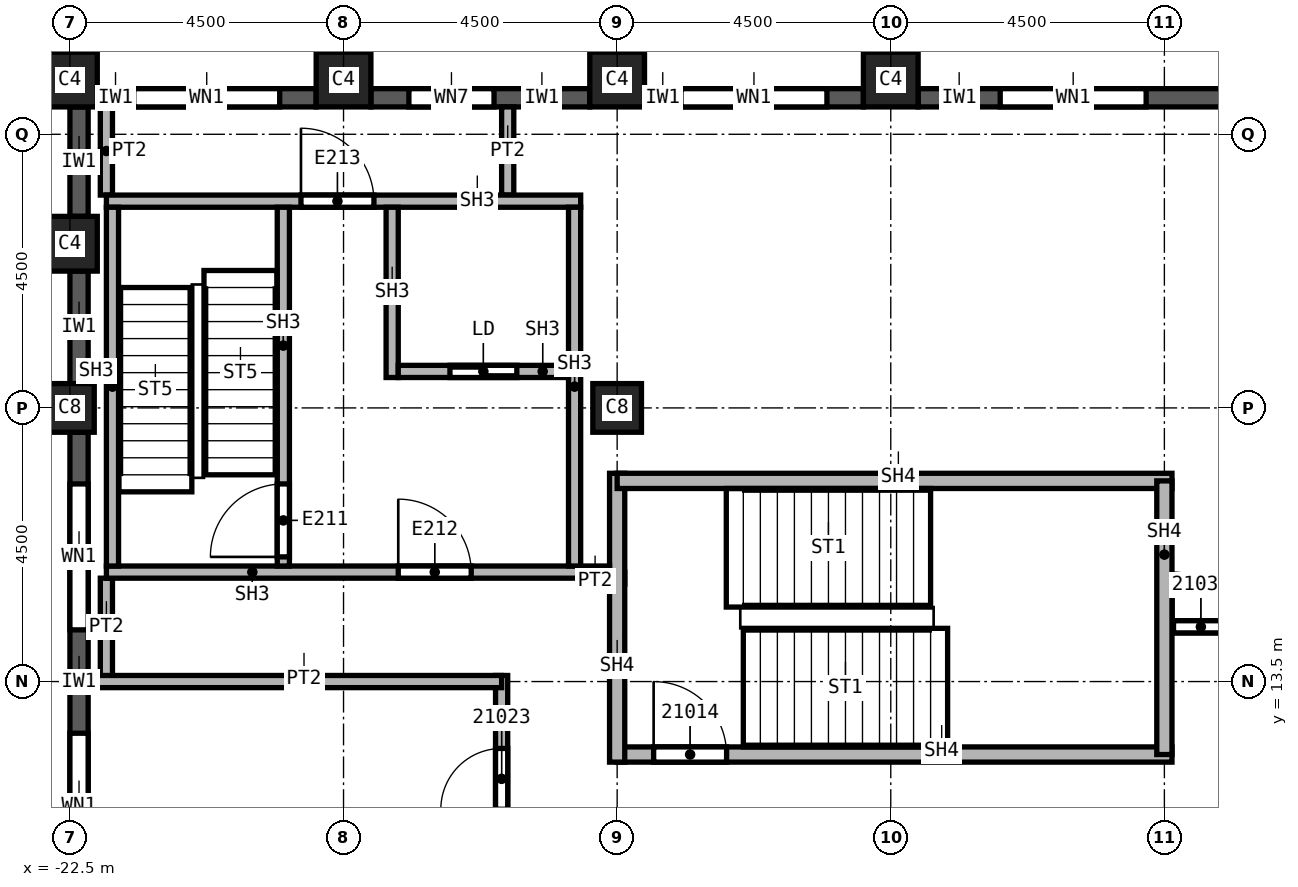
"""IFC4 building model, lengths in metres.
Left out: names, types, materials, properties, quantities, classifications, styles, units other than length and angle.
Written with IfcOpenShell. Run it as: python <this file> out.ifc"""

import sys

from ifc_helpers import new_model, si_unit, direction, frame, frame_2d, origin, origin_2d, place, context, subcontext, project, spatial, rectangle, extrude, element, fill, save


model = new_model("IFC4")
c1 = context("Model", 3, precision=1e-05, world=origin(), true_north=direction((0.0, 1.0)))
c2 = subcontext(c1, "Body", "Model", "MODEL_VIEW")
j1 = project(units=[si_unit("LENGTHUNIT", "METRE"), si_unit("PLANEANGLEUNIT", "RADIAN")], contexts=[c1])
p1 = place(None, origin())
s1 = spatial("IfcSite", under=j1, at=p1, CompositionType="ELEMENT")
p2 = place(p1, origin())
s2 = spatial("IfcBuilding", under=s1, at=p2, CompositionType="ELEMENT")
p3 = place(p2, frame((0.0, 0.0, 300.0)))
s3 = spatial("IfcBuildingStorey", under=s2, at=p3, CompositionType="ELEMENT", Elevation=300.0)
for number, where, z_axis, x_axis in (
    (1, (-13.5, 18.0, 0.0), (0.0, 0.0, 1.0), (1.0, 0.0, 0.0)),
    (2, (-22.5, 18.0, 0.0), (0.0, 0.0, 1.0), (1.0, 0.0, 0.0)),
):
    element("IfcColumn", number, at=place(p3, frame(where, z_axis=z_axis, x_axis=x_axis)), inside=s3, PredefinedType="COLUMN", context=c2, shape_type="SweptSolid", body=[
        extrude(rectangle(XDim=0.8, YDim=0.8, at=origin_2d()), origin(), (0.0, 0.0, 1.0), 3.74),
    ])
for number, where, z_axis, x_axis in (
    (3, (-9.0, 23.4, 0.0), (0.0, 0.0, 1.0), (1.0, 0.0, 0.0)),
    (4, (-13.5, 23.4, 0.0), (0.0, 0.0, 1.0), (1.0, 0.0, 0.0)),
    (5, (-18.0, 23.4, 0.0), (0.0, 0.0, 1.0), (1.0, 0.0, 0.0)),
    (6, (-22.5, 23.4, 0.0), (0.0, 0.0, 1.0), (1.0, 0.0, 0.0)),
    (7, (-22.5, 20.7, 0.0), (0.0, 0.0, 1.0), (1.0, 0.0, 0.0)),
):
    element("IfcColumn", number, at=place(p3, frame(where, z_axis=z_axis, x_axis=x_axis)), inside=s3, PredefinedType="COLUMN", context=c2, shape_type="SweptSolid", body=[
        extrude(rectangle(XDim=0.9, YDim=0.9, at=origin_2d()), origin(), (0.0, 0.0, 1.0), 3.74),
    ])
p4 = place(p3, frame((-3.45, 23.1, 0.0), z_axis=(0.0, 0.0, 1.0), x_axis=(-1.0, 0.0, 0.0)))
e8 = element("IfcWall", 8, at=p4, inside=s3, PredefinedType="SOLIDWALL", context=c2, shape_type="SweptSolid", body=[
    extrude(rectangle(XDim=5.1, YDim=0.3, at=frame_2d((2.55, 0.0))), origin(), (0.0, 0.0, 1.0), 3.14),
])
p5 = place(p4, frame((1.35, 0.0, 0.8)))
e9 = element("IfcOpeningElement", 9, at=p5, cuts=e8, PredefinedType="OPENING", context=c2, shape_type="SweptSolid", body=[
    extrude(rectangle(XDim=2.4, YDim=1.95, at=frame_2d((1.2, 0.975))), frame((0.0, 0.15, 0.0), z_axis=(0.0, -1.0, 0.0), x_axis=(1.0, 0.0, 0.0)), (0.0, 0.0, 1.0), 0.3),
])
p6 = place(p3, frame((-9.45, 23.1, 0.0), z_axis=(0.0, 0.0, 1.0), x_axis=(-1.0, 0.0, 0.0)))
e10 = element("IfcWall", 10, at=p6, inside=s3, PredefinedType="SOLIDWALL", context=c2, shape_type="SweptSolid", body=[
    extrude(rectangle(XDim=3.6, YDim=0.3, at=frame_2d((1.8, 0.0))), origin(), (0.0, 0.0, 1.0), 3.14),
])
p7 = place(p6, frame((0.6, 0.0, 0.8)))
e11 = element("IfcOpeningElement", 11, at=p7, cuts=e10, PredefinedType="OPENING", context=c2, shape_type="SweptSolid", body=[
    extrude(rectangle(XDim=2.4, YDim=1.95, at=frame_2d((1.2, 0.975))), frame((0.0, 0.15, 0.0), z_axis=(0.0, -1.0, 0.0), x_axis=(1.0, 0.0, 0.0)), (0.0, 0.0, 1.0), 0.3),
])
p8 = place(p3, frame((-13.95, 23.1, 0.0), z_axis=(0.0, 0.0, 1.0), x_axis=(-1.0, 0.0, 0.0)))
e12 = element("IfcWall", 12, at=p8, inside=s3, PredefinedType="SOLIDWALL", context=c2, shape_type="SweptSolid", body=[
    extrude(rectangle(XDim=3.6, YDim=0.3, at=frame_2d((1.8, 0.0))), origin(), (0.0, 0.0, 1.0), 3.14),
])
p9 = place(p8, frame((1.575, 0.0, 0.8)))
e13 = element("IfcOpeningElement", 13, at=p9, cuts=e12, PredefinedType="OPENING", context=c2, shape_type="SweptSolid", body=[
    extrude(rectangle(XDim=1.4, YDim=1.95, at=frame_2d((0.7, 0.975))), frame((0.0, 0.15, 0.0), z_axis=(0.0, -1.0, 0.0), x_axis=(1.0, 0.0, 0.0)), (0.0, 0.0, 1.0), 0.3),
])
p10 = place(p3, frame((-18.45, 23.1, 0.0), z_axis=(0.0, 0.0, 1.0), x_axis=(-1.0, 0.0, 0.0)))
e14 = element("IfcWall", 14, at=p10, inside=s3, PredefinedType="SOLIDWALL", context=c2, shape_type="SweptSolid", body=[
    extrude(rectangle(XDim=3.6, YDim=0.3, at=frame_2d((1.8, 0.0))), origin(), (0.0, 0.0, 1.0), 3.14),
])
p11 = place(p10, frame((0.6, 0.0, 0.8)))
e15 = element("IfcOpeningElement", 15, at=p11, cuts=e14, PredefinedType="OPENING", context=c2, shape_type="SweptSolid", body=[
    extrude(rectangle(XDim=2.4, YDim=1.95, at=frame_2d((1.2, 0.975))), frame((0.0, 0.15, 0.0), z_axis=(0.0, -1.0, 0.0), x_axis=(1.0, 0.0, 0.0)), (0.0, 0.0, 1.0), 0.3),
])
p12 = place(p3, frame((-22.35, 17.6, 0.0), z_axis=(0.0, 0.0, 1.0), x_axis=(0.0, -1.0, 0.0)))
e16 = element("IfcWall", 16, at=p12, inside=s3, PredefinedType="SOLIDWALL", context=c2, shape_type="SweptSolid", body=[
    extrude(rectangle(XDim=8.2, YDim=0.3, at=frame_2d((4.1, 0.0))), origin(), (0.0, 0.0, 1.0), 3.14),
])
p13 = place(p12, frame((0.85, 0.0, 0.8)))
e17 = element("IfcOpeningElement", 17, at=p13, cuts=e16, PredefinedType="OPENING", context=c2, shape_type="SweptSolid", body=[
    extrude(rectangle(XDim=2.4, YDim=1.95, at=frame_2d((1.2, 0.975))), frame((0.0, 0.15, 0.0), z_axis=(0.0, -1.0, 0.0), x_axis=(1.0, 0.0, 0.0)), (0.0, 0.0, 1.0), 0.3),
])
p14 = place(p12, frame((4.95, 0.0, 0.8)))
e18 = element("IfcOpeningElement", 18, at=p14, cuts=e16, PredefinedType="OPENING", context=c2, shape_type="SweptSolid", body=[
    extrude(rectangle(XDim=2.4, YDim=1.95, at=frame_2d((1.2, 0.975))), frame((0.0, 0.15, 0.0), z_axis=(0.0, -1.0, 0.0), x_axis=(1.0, 0.0, 0.0)), (0.0, 0.0, 1.0), 0.3),
])
p15 = place(p3, frame((-22.35, 20.25, 0.0), z_axis=(0.0, 0.0, 1.0), x_axis=(0.0, -1.0, 0.0)))
e19 = element("IfcWall", 19, at=p15, inside=s3, PredefinedType="SOLIDWALL", context=c2, shape_type="SweptSolid", body=[
    extrude(rectangle(XDim=1.85, YDim=0.3, at=frame_2d((0.925, 0.0))), origin(), (0.0, 0.0, 1.0), 3.14),
])
p16 = place(p3, frame((-22.35, 22.95, 0.0), z_axis=(0.0, 0.0, 1.0), x_axis=(0.0, -1.0, 0.0)))
e20 = element("IfcWall", 20, at=p16, inside=s3, PredefinedType="SOLIDWALL", context=c2, shape_type="SweptSolid", body=[
    extrude(rectangle(XDim=1.8, YDim=0.3, at=frame_2d((0.9, 0.0))), origin(), (0.0, 0.0, 1.0), 3.14),
])
p17 = place(p3, frame((-21.9, 13.5, 0.0), z_axis=(0.0, 0.0, 1.0), x_axis=(0.0, 1.0, 0.0)))
e21 = element("IfcWall", 21, at=p17, inside=s3, PredefinedType="PARTITIONING", context=c2, shape_type="SweptSolid", body=[
    extrude(rectangle(XDim=1.7, YDim=0.2, at=frame_2d((0.85, 0.0))), origin(), (0.0, 0.0, 1.0), 3.74),
])
p18 = place(p3, frame((-21.9, 21.5, 0.0), z_axis=(0.0, 0.0, 1.0), x_axis=(0.0, 1.0, 0.0)))
e22 = element("IfcWall", 22, at=p18, inside=s3, PredefinedType="PARTITIONING", context=c2, shape_type="SweptSolid", body=[
    extrude(rectangle(XDim=1.45, YDim=0.2, at=frame_2d((0.725, 0.0))), origin(), (0.0, 0.0, 1.0), 3.74),
])
p19 = place(p3, frame((-15.4, -22.95, 0.0), z_axis=(0.0, 0.0, 1.0), x_axis=(0.0, 1.0, 0.0)))
e23 = element("IfcWall", 23, at=p19, inside=s3, PredefinedType="PARTITIONING", context=c2, shape_type="SweptSolid", body=[
    extrude(rectangle(XDim=36.55, YDim=0.2, at=frame_2d((18.275, 0.0))), origin(), (0.0, 0.0, 1.0), 3.74),
])
p20 = place(p19, frame((23.1, 0.0, 0.0)))
e24 = element("IfcOpeningElement", 24, at=p20, cuts=e23, PredefinedType="OPENING", context=c2, shape_type="SweptSolid", body=[
    extrude(rectangle(XDim=1.0, YDim=2.1, at=frame_2d((0.5, 1.05))), frame((0.0, 0.1, 0.0), z_axis=(0.0, -1.0, 0.0), x_axis=(1.0, 0.0, 0.0)), (0.0, 0.0, 1.0), 0.2),
])
p21 = place(p19, frame((34.35, 0.0, 0.0)))
e25 = element("IfcOpeningElement", 25, at=p21, cuts=e23, PredefinedType="OPENING", context=c2, shape_type="SweptSolid", body=[
    extrude(rectangle(XDim=1.0, YDim=2.1, at=frame_2d((0.5, 1.05))), frame((0.0, 0.1, 0.0), z_axis=(0.0, -1.0, 0.0), x_axis=(1.0, 0.0, 0.0)), (0.0, 0.0, 1.0), 0.2),
])
p22 = place(p19, frame((2.95, 0.0, 0.0)))
e26 = element("IfcOpeningElement", 26, at=p22, cuts=e23, PredefinedType="OPENING", context=c2, shape_type="SweptSolid", body=[
    extrude(rectangle(XDim=1.0, YDim=2.1, at=frame_2d((0.5, 1.05))), frame((0.0, 0.1, 0.0), z_axis=(0.0, -1.0, 0.0), x_axis=(1.0, 0.0, 0.0)), (0.0, 0.0, 1.0), 0.2),
])
p23 = place(p19, frame((6.15, 0.0, 0.0)))
e27 = element("IfcOpeningElement", 27, at=p23, cuts=e23, PredefinedType="OPENING", context=c2, shape_type="SweptSolid", body=[
    extrude(rectangle(XDim=1.0, YDim=2.1, at=frame_2d((0.5, 1.05))), frame((0.0, 0.1, 0.0), z_axis=(0.0, -1.0, 0.0), x_axis=(1.0, 0.0, 0.0)), (0.0, 0.0, 1.0), 0.2),
])
p24 = place(p19, frame((8.625, 0.0, 0.0)))
e28 = element("IfcOpeningElement", 28, at=p24, cuts=e23, PredefinedType="OPENING", context=c2, shape_type="SweptSolid", body=[
    extrude(rectangle(XDim=1.0, YDim=2.1, at=frame_2d((0.5, 1.05))), frame((0.0, 0.1, 0.0), z_axis=(0.0, -1.0, 0.0), x_axis=(1.0, 0.0, 0.0)), (0.0, 0.0, 1.0), 0.2),
])
p25 = place(p19, frame((15.0, 0.0, 0.0)))
e29 = element("IfcOpeningElement", 29, at=p25, cuts=e23, PredefinedType="OPENING", context=c2, shape_type="SweptSolid", body=[
    extrude(rectangle(XDim=1.0, YDim=2.1, at=frame_2d((0.5, 1.05))), frame((0.0, 0.1, 0.0), z_axis=(0.0, -1.0, 0.0), x_axis=(1.0, 0.0, 0.0)), (0.0, 0.0, 1.0), 0.2),
])
p26 = place(p3, frame((-15.4, 13.5, 0.0), z_axis=(0.0, 0.0, 1.0), x_axis=(-1.0, 0.0, 0.0)))
e30 = element("IfcWall", 30, at=p26, inside=s3, PredefinedType="PARTITIONING", context=c2, shape_type="SweptSolid", body=[
    extrude(rectangle(XDim=6.8, YDim=0.2, at=frame_2d((3.4, 0.0))), origin(), (0.0, 0.0, 1.0), 3.74),
])
p27 = place(p3, frame((-15.3, 22.95, 0.0), z_axis=(0.0, 0.0, 1.0), x_axis=(0.0, -1.0, 0.0)))
e31 = element("IfcWall", 31, at=p27, inside=s3, PredefinedType="PARTITIONING", context=c2, shape_type="SweptSolid", body=[
    extrude(rectangle(XDim=1.45, YDim=0.2, at=frame_2d((0.725, 0.0))), origin(), (0.0, 0.0, 1.0), 3.74),
])
p28 = place(p3, frame((-14.1, 15.2, 0.0), z_axis=(0.0, 0.0, 1.0), x_axis=(1.0, 0.0, 0.0)))
e32 = element("IfcWall", 32, at=p28, inside=s3, PredefinedType="PARTITIONING", context=c2, shape_type="SweptSolid", body=[
    extrude(rectangle(XDim=0.725, YDim=0.2, at=frame_2d((0.363, 0.0))), origin(), (0.0, 0.0, 1.0), 3.74),
])
p29 = place(p3, frame((-4.5, 14.4, 0.0), z_axis=(0.0, 0.0, 1.0), x_axis=(1.0, 0.0, 0.0)))
e33 = element("IfcWall", 33, at=p29, inside=s3, PredefinedType="PARTITIONING", context=c2, shape_type="SweptSolid", body=[
    extrude(rectangle(XDim=3.6, YDim=0.2, at=frame_2d((1.8, 0.0))), origin(), (0.0, 0.0, 1.0), 3.207),
])
p30 = place(p29, frame((0.15, 0.0, 0.0)))
e34 = element("IfcOpeningElement", 34, at=p30, cuts=e33, PredefinedType="OPENING", context=c2, shape_type="SweptSolid", body=[
    extrude(rectangle(XDim=0.9, YDim=2.1, at=frame_2d((0.45, 1.05))), frame((0.0, 0.1, 0.0), z_axis=(0.0, -1.0, 0.0), x_axis=(1.0, 0.0, 0.0)), (0.0, 0.0, 1.0), 0.2),
])
p31 = place(p3, frame((-13.5, 12.3, 0.0), z_axis=(0.0, 0.0, 1.0), x_axis=(1.0, 0.0, 0.0)))
e35 = element("IfcWall", 35, at=p31, inside=s3, PredefinedType="SOLIDWALL", context=c2, shape_type="SweptSolid", body=[
    extrude(rectangle(XDim=9.125, YDim=0.25, at=frame_2d((4.562, 0.0))), origin(), (0.0, 0.0, 1.0), 3.74),
])
p32 = place(p31, frame((0.6, 0.0, 0.0)))
e36 = element("IfcOpeningElement", 36, at=p32, cuts=e35, PredefinedType="OPENING", context=c2, shape_type="SweptSolid", body=[
    extrude(rectangle(XDim=1.2, YDim=2.1, at=frame_2d((0.6, 1.05))), frame((0.0, 0.125, 0.0), z_axis=(0.0, -1.0, 0.0), x_axis=(1.0, 0.0, 0.0)), (0.0, 0.0, 1.0), 0.25),
])
p33 = place(p3, frame((-13.5, 12.175, 0.0), z_axis=(0.0, 0.0, 1.0), x_axis=(0.0, 1.0, 0.0)))
e37 = element("IfcWall", 37, at=p33, inside=s3, PredefinedType="SOLIDWALL", context=c2, shape_type="SweptSolid", body=[
    extrude(rectangle(XDim=4.75, YDim=0.25, at=frame_2d((2.375, 0.0))), origin(), (0.0, 0.0, 1.0), 3.74),
])
p34 = place(p3, frame((-13.5, 16.8, 0.0), z_axis=(0.0, 0.0, 1.0), x_axis=(1.0, 0.0, 0.0)))
e38 = element("IfcWall", 38, at=p34, inside=s3, PredefinedType="SOLIDWALL", context=c2, shape_type="SweptSolid", body=[
    extrude(rectangle(XDim=9.125, YDim=0.25, at=frame_2d((4.562, 0.0))), origin(), (0.0, 0.0, 1.0), 3.74),
])
p35 = place(p3, frame((-4.5, 16.8, 0.0), z_axis=(0.0, 0.0, 1.0), x_axis=(0.0, -1.0, 0.0)))
e39 = element("IfcWall", 39, at=p35, inside=s3, PredefinedType="SOLIDWALL", context=c2, shape_type="SweptSolid", body=[
    extrude(rectangle(XDim=4.5, YDim=0.25, at=frame_2d((2.25, 0.0))), origin(), (0.0, 0.0, 1.0), 3.74),
])
p36 = place(p3, frame((-21.9, 15.3, 0.0), z_axis=(0.0, 0.0, 1.0), x_axis=(1.0, 0.0, 0.0)))
e40 = element("IfcWall", 40, at=p36, inside=s3, PredefinedType="SOLIDWALL", context=c2, shape_type="SweptSolid", body=[
    extrude(rectangle(XDim=8.275, YDim=0.2, at=frame_2d((4.137, 0.0))), origin(), (0.0, 0.0, 1.0), 3.74),
])
p37 = place(p36, frame((4.8, 0.0, 0.0)))
e41 = element("IfcOpeningElement", 41, at=p37, cuts=e40, PredefinedType="OPENING", context=c2, shape_type="SweptSolid", body=[
    extrude(rectangle(XDim=1.2, YDim=2.1, at=frame_2d((0.6, 1.05))), frame((0.0, 0.1, 0.0), z_axis=(0.0, -1.0, 0.0), x_axis=(1.0, 0.0, 0.0)), (0.0, 0.0, 1.0), 0.2),
])
p38 = place(p3, frame((-21.9, 21.4, 0.0), z_axis=(0.0, 0.0, 1.0), x_axis=(1.0, 0.0, 0.0)))
e42 = element("IfcWall", 42, at=p38, inside=s3, PredefinedType="SOLIDWALL", context=c2, shape_type="SweptSolid", body=[
    extrude(rectangle(XDim=7.8, YDim=0.2, at=frame_2d((3.9, 0.0))), origin(), (0.0, 0.0, 1.0), 3.74),
])
p39 = place(p38, frame((3.2, 0.0, 0.0)))
e43 = element("IfcOpeningElement", 43, at=p39, cuts=e42, PredefinedType="OPENING", context=c2, shape_type="SweptSolid", body=[
    extrude(rectangle(XDim=1.2, YDim=2.1, at=frame_2d((0.6, 1.05))), frame((0.0, 0.1, 0.0), z_axis=(0.0, -1.0, 0.0), x_axis=(1.0, 0.0, 0.0)), (0.0, 0.0, 1.0), 0.2),
])
for number, where, z_axis, x_axis in (
    (44, (-21.8, 15.4, 0.0), (0.0, 0.0, 1.0), (0.0, 1.0, 0.0)),
    (45, (-14.2, 15.4, 0.0), (0.0, 0.0, 1.0), (0.0, 1.0, 0.0)),
):
    element("IfcWall", number, at=place(p3, frame(where, z_axis=z_axis, x_axis=x_axis)), inside=s3, PredefinedType="SOLIDWALL", context=c2, shape_type="SweptSolid", body=[
        extrude(rectangle(XDim=5.9, YDim=0.2, at=frame_2d((2.95, 0.0))), origin(), (0.0, 0.0, 1.0), 3.74),
    ])
p40 = place(p3, frame((-18.99, 15.4, 0.0), z_axis=(0.0, 0.0, 1.0), x_axis=(0.0, 1.0, 0.0)))
e46 = element("IfcWall", 46, at=p40, inside=s3, PredefinedType="SOLIDWALL", context=c2, shape_type="SweptSolid", body=[
    extrude(rectangle(XDim=5.9, YDim=0.2, at=frame_2d((2.95, 0.0))), origin(), (0.0, 0.0, 1.0), 3.74),
])
p41 = place(p40, frame((0.15, 0.0, 0.0)))
e47 = element("IfcOpeningElement", 47, at=p41, cuts=e46, PredefinedType="OPENING", context=c2, shape_type="SweptSolid", body=[
    extrude(rectangle(XDim=1.2, YDim=2.1, at=frame_2d((0.6, 1.05))), frame((0.0, 0.1, 0.0), z_axis=(0.0, -1.0, 0.0), x_axis=(1.0, 0.0, 0.0)), (0.0, 0.0, 1.0), 0.2),
])
p42 = place(p3, frame((-17.2, 18.5, 0.0), z_axis=(0.0, 0.0, 1.0), x_axis=(0.0, 1.0, 0.0)))
e48 = element("IfcWall", 48, at=p42, inside=s3, PredefinedType="SOLIDWALL", context=c2, shape_type="SweptSolid", body=[
    extrude(rectangle(XDim=2.8, YDim=0.2, at=frame_2d((1.4, 0.0))), origin(), (0.0, 0.0, 1.0), 3.74),
])
p43 = place(p3, frame((-17.1, 18.6, 0.0), z_axis=(0.0, 0.0, 1.0), x_axis=(1.0, 0.0, 0.0)))
e49 = element("IfcWall", 49, at=p43, inside=s3, PredefinedType="SOLIDWALL", context=c2, shape_type="SweptSolid", body=[
    extrude(rectangle(XDim=2.8, YDim=0.2, at=frame_2d((1.4, 0.0))), origin(), (0.0, 0.0, 1.0), 3.74),
])
p44 = place(p43, frame((0.85, 0.0, 0.0)))
e50 = element("IfcOpeningElement", 50, at=p44, cuts=e49, PredefinedType="OPENING", context=c2, shape_type="SweptSolid", body=[
    extrude(rectangle(XDim=1.1, YDim=2.1, at=frame_2d((0.55, 1.05))), frame((0.0, 0.1, 0.0), z_axis=(0.0, -1.0, 0.0), x_axis=(1.0, 0.0, 0.0)), (0.0, 0.0, 1.0), 0.2),
])
p45 = place(p5, origin())
e51 = element("IfcWindow", 51, at=p45, inside=s3, PartitioningType="SINGLE_PANEL", PredefinedType="WINDOW", context=c2, shape_type="SweptSolid", body=[
    extrude(rectangle(XDim=2.4, YDim=1.95, at=frame_2d((1.2, 0.975))), frame((0.0, 0.03, 0.0), z_axis=(0.0, -1.0, 0.0), x_axis=(1.0, 0.0, 0.0)), (0.0, 0.0, 1.0), 0.06),
])
fill(e9, e51)
p46 = place(p7, origin())
e52 = element("IfcWindow", 52, at=p46, inside=s3, PartitioningType="SINGLE_PANEL", PredefinedType="WINDOW", context=c2, shape_type="SweptSolid", body=[
    extrude(rectangle(XDim=2.4, YDim=1.95, at=frame_2d((1.2, 0.975))), frame((0.0, 0.03, 0.0), z_axis=(0.0, -1.0, 0.0), x_axis=(1.0, 0.0, 0.0)), (0.0, 0.0, 1.0), 0.06),
])
fill(e11, e52)
p47 = place(p11, origin())
e53 = element("IfcWindow", 53, at=p47, inside=s3, PartitioningType="SINGLE_PANEL", PredefinedType="WINDOW", context=c2, shape_type="SweptSolid", body=[
    extrude(rectangle(XDim=2.4, YDim=1.95, at=frame_2d((1.2, 0.975))), frame((0.0, 0.03, 0.0), z_axis=(0.0, -1.0, 0.0), x_axis=(1.0, 0.0, 0.0)), (0.0, 0.0, 1.0), 0.06),
])
fill(e15, e53)
p48 = place(p13, origin())
e54 = element("IfcWindow", 54, at=p48, inside=s3, PartitioningType="SINGLE_PANEL", PredefinedType="WINDOW", context=c2, shape_type="SweptSolid", body=[
    extrude(rectangle(XDim=2.4, YDim=1.95, at=frame_2d((1.2, 0.975))), frame((0.0, 0.03, 0.0), z_axis=(0.0, -1.0, 0.0), x_axis=(1.0, 0.0, 0.0)), (0.0, 0.0, 1.0), 0.06),
])
fill(e17, e54)
p49 = place(p14, origin())
e55 = element("IfcWindow", 55, at=p49, inside=s3, PartitioningType="SINGLE_PANEL", PredefinedType="WINDOW", context=c2, shape_type="SweptSolid", body=[
    extrude(rectangle(XDim=2.4, YDim=1.95, at=frame_2d((1.2, 0.975))), frame((0.0, 0.03, 0.0), z_axis=(0.0, -1.0, 0.0), x_axis=(1.0, 0.0, 0.0)), (0.0, 0.0, 1.0), 0.06),
])
fill(e18, e55)
p50 = place(p32, origin())
e56 = element("IfcDoor", 56, at=p50, inside=s3, OperationType="SINGLE_SWING_LEFT", PredefinedType="DOOR", context=c2, shape_type="SweptSolid", body=[
    extrude(rectangle(XDim=1.2, YDim=2.1, at=frame_2d((0.6, 1.05))), frame((0.0, 0.025, 0.0), z_axis=(0.0, -1.0, 0.0), x_axis=(1.0, 0.0, 0.0)), (0.0, 0.0, 1.0), 0.05),
])
fill(e36, e56)
p51 = place(p21, origin())
e57 = element("IfcDoor", 57, at=p51, inside=s3, OperationType="SINGLE_SWING_RIGHT", PredefinedType="DOOR", context=c2, shape_type="SweptSolid", body=[
    extrude(rectangle(XDim=1.0, YDim=2.1, at=frame_2d((0.5, 1.05))), frame((0.0, 0.025, 0.0), z_axis=(0.0, -1.0, 0.0), x_axis=(1.0, 0.0, 0.0)), (0.0, 0.0, 1.0), 0.05),
])
fill(e25, e57)
p52 = place(p30, origin())
e58 = element("IfcDoor", 58, at=p52, inside=s3, OperationType="SINGLE_SWING_LEFT", PredefinedType="DOOR", context=c2, shape_type="SweptSolid", body=[
    extrude(rectangle(XDim=0.9, YDim=2.1, at=frame_2d((0.45, 1.05))), frame((0.0, 0.025, 0.0), z_axis=(0.0, -1.0, 0.0), x_axis=(1.0, 0.0, 0.0)), (0.0, 0.0, 1.0), 0.05),
])
fill(e34, e58)
p53 = place(p41, origin())
e59 = element("IfcDoor", 59, at=p53, inside=s3, OperationType="SINGLE_SWING_LEFT", PredefinedType="DOOR", context=c2, shape_type="SweptSolid", body=[
    extrude(rectangle(XDim=1.2, YDim=2.1, at=frame_2d((0.6, 1.05))), frame((0.0, 0.025, 0.0), z_axis=(0.0, -1.0, 0.0), x_axis=(1.0, 0.0, 0.0)), (0.0, 0.0, 1.0), 0.05),
])
fill(e47, e59)
p54 = place(p44, origin())
e60 = element("IfcDoor", 60, at=p54, inside=s3, OperationType="SLIDING_TO_LEFT", PredefinedType="DOOR", context=c2, shape_type="SweptSolid", body=[
    extrude(rectangle(XDim=1.1, YDim=2.1, at=frame_2d((0.55, 1.05))), frame((0.0, 0.025, 0.0), z_axis=(0.0, -1.0, 0.0), x_axis=(1.0, 0.0, 0.0)), (0.0, 0.0, 1.0), 0.05),
])
fill(e50, e60)
p55 = place(p37, origin())
e61 = element("IfcDoor", 61, at=p55, inside=s3, OperationType="SINGLE_SWING_RIGHT", PredefinedType="DOOR", context=c2, shape_type="SweptSolid", body=[
    extrude(rectangle(XDim=1.2, YDim=2.1, at=frame_2d((0.6, 1.05))), frame((0.0, 0.025, 0.0), z_axis=(0.0, -1.0, 0.0), x_axis=(1.0, 0.0, 0.0)), (0.0, 0.0, 1.0), 0.05),
])
fill(e41, e61)
p56 = place(p39, origin())
e62 = element("IfcDoor", 62, at=p56, inside=s3, OperationType="SINGLE_SWING_LEFT", PredefinedType="DOOR", context=c2, shape_type="SweptSolid", body=[
    extrude(rectangle(XDim=1.2, YDim=2.1, at=frame_2d((0.6, 1.05))), frame((0.0, 0.025, 0.0), z_axis=(0.0, -1.0, 0.0), x_axis=(1.0, 0.0, 0.0)), (0.0, 0.0, 1.0), 0.05),
])
fill(e43, e62)
p57 = place(p9, origin())
e63 = element("IfcWindow", 63, at=p57, inside=s3, PartitioningType="SINGLE_PANEL", PredefinedType="WINDOW", context=c2, shape_type="SweptSolid", body=[
    extrude(rectangle(XDim=1.4, YDim=1.95, at=frame_2d((0.7, 0.975))), frame((0.0, 0.03, 0.0), z_axis=(0.0, -1.0, 0.0), x_axis=(1.0, 0.0, 0.0)), (0.0, 0.0, 1.0), 0.06),
])
fill(e13, e63)
save(model, sys.argv[1])
